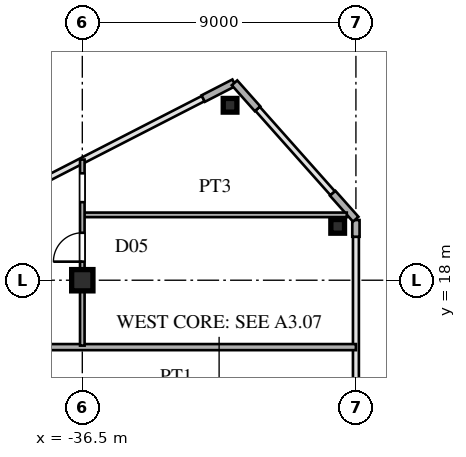
"""IFC4 building model, lengths in metres.
Left out: names, types, materials, properties, quantities, classifications, styles, units other than length and angle.
Written with IfcOpenShell. Run it as: python <this file> out.ifc"""

import sys

from ifc_helpers import new_model, si_unit, direction, frame, frame_2d, origin, origin_2d, place, context, subcontext, project, spatial, rectangle, hollow_rectangle, i_section, extrude, source, transform, mapped, element, fill, save


model = new_model("IFC4")
c1 = context("Model", 3, precision=1e-05, world=origin(), true_north=direction((0.0, 1.0)))
c2 = subcontext(c1, "Body", "Model", "MODEL_VIEW")
j1 = project(units=[si_unit("LENGTHUNIT", "METRE"), si_unit("PLANEANGLEUNIT", "RADIAN")], contexts=[c1])
p1 = place(None, origin())
s1 = spatial("IfcSite", under=j1, at=p1, CompositionType="ELEMENT")
p2 = place(p1, origin())
s2 = spatial("IfcBuilding", under=s1, at=p2, CompositionType="ELEMENT")
p3 = place(p2, frame((0.0, 0.0, 154.8)))
s3 = spatial("IfcBuildingStorey", under=s2, at=p3, CompositionType="ELEMENT", Elevation=154.8)
m1 = source(origin(), c2, "Body", "SweptSolid", [
    extrude(i_section(OverallWidth=0.7, OverallDepth=0.7, WebThickness=0.028, FlangeThickness=0.045, at=origin_2d()), origin(), (0.0, 0.0, 1.0), 3.6),
])
p4 = place(p3, frame((-36.5, 18.0, 0.0), z_axis=(0.0, 0.0, 1.0), x_axis=(1.0, 0.0, 0.0)))
e1 = element("IfcColumn", 1, at=p4, inside=s3, PredefinedType="COLUMN", context=c2, shape_type="MappedRepresentation", body=[
    mapped(m1, transform((0.0, 0.0, 0.0), scale=1.0)),
])
m2 = source(origin(), c2, "Body", "SweptSolid", [
    extrude(hollow_rectangle(XDim=0.45, YDim=0.45, WallThickness=0.018, at=origin_2d()), origin(), (0.0, 0.0, 1.0), 3.6),
])
for number, where, z_axis, x_axis in (
    (2, (-28.1, 19.772, 0.0), (0.0, 0.0, 1.0), (1.0, 0.0, 0.0)),
    (3, (-31.64, 23.754, 0.0), (0.0, 0.0, 1.0), (1.0, 0.0, 0.0)),
):
    element("IfcColumn", number, at=place(p3, frame(where, z_axis=z_axis, x_axis=x_axis)), inside=s3, PredefinedType="COLUMN", context=c2, shape_type="MappedRepresentation", body=[
        mapped(m2, transform((0.0, 0.0, 0.0), scale=1.0)),
    ])
p5 = place(p3, frame((-27.5, 19.43, 0.0), z_axis=(0.0, 0.0, 1.0), x_axis=(0.0, 1.0, 0.0)))
e4 = element("IfcWall", 4, at=p5, inside=s3, PredefinedType="SOLIDWALL", context=c2, shape_type="SweptSolid", body=[
    extrude(rectangle(XDim=0.55, YDim=0.24, at=frame_2d((0.275, 0.0))), origin(), (0.0, 0.0, 1.0), 3.38),
])
for number, where, z_axis, x_axis in (
    (5, (-27.507, 20.008, 0.0), (0.0, 0.0, 1.0), (-0.664, 0.747, 0.0)),
    (6, (-30.736, 23.64, 0.0), (0.0, 0.0, 1.0), (-0.664, 0.747, 0.0)),
):
    element("IfcWall", number, at=place(p3, frame(where, z_axis=z_axis, x_axis=x_axis)), inside=s3, PredefinedType="SOLIDWALL", context=c2, shape_type="SweptSolid", body=[
        extrude(rectangle(XDim=1.14, YDim=0.24, at=frame_2d((0.57, 0.0))), origin(), (0.0, 0.0, 1.0), 3.38),
    ])
p6 = place(p3, frame((-31.509, 24.495, 0.0), z_axis=(0.0, 0.0, 1.0), x_axis=(-0.889797395748, -0.456355776255, 0.0)))
e7 = element("IfcWall", 7, at=p6, inside=s3, PredefinedType="SOLIDWALL", context=c2, shape_type="SweptSolid", body=[
    extrude(rectangle(XDim=1.14, YDim=0.24, at=frame_2d((0.57, 0.0))), origin(), (0.0, 0.0, 1.0), 3.38),
])
p7 = place(p3, frame((-39.315, 15.8, 0.0), z_axis=(0.0, 0.0, 1.0), x_axis=(1.0, 0.0, 0.0)))
e8 = element("IfcWall", 8, at=p7, inside=s3, PredefinedType="PARTITIONING", context=c2, shape_type="SweptSolid", body=[
    extrude(rectangle(XDim=11.815, YDim=0.2, at=frame_2d((5.907, 0.0))), origin(), (0.0, 0.0, 1.0), 3.38),
])
p8 = place(p3, frame((-36.45, 20.15, 0.0), z_axis=(0.0, 0.0, 1.0), x_axis=(1.0, 0.0, 0.0)))
e9 = element("IfcWall", 9, at=p8, inside=s3, PredefinedType="PARTITIONING", context=c2, shape_type="SweptSolid", body=[
    extrude(rectangle(XDim=8.649, YDim=0.15, at=frame_2d((4.325, 0.0))), origin(), (0.0, 0.0, 1.0), 3.38),
])
p9 = place(p3, frame((-36.5, 15.85, 0.0), z_axis=(0.0, 0.0, 1.0), x_axis=(0.0, 1.0, 0.0)))
e10 = element("IfcWall", 10, at=p9, inside=s3, PredefinedType="PARTITIONING", context=c2, shape_type="SweptSolid", body=[
    extrude(rectangle(XDim=2.17, YDim=0.15, at=frame_2d((1.085, 0.0))), origin(), (0.0, 0.0, 1.0), 1.38),
])
p10 = place(p3, frame((-36.5, 18.02, 0.0), z_axis=(0.0, 0.0, 1.0), x_axis=(0.0, 1.0, 0.0)))
e11 = element("IfcWall", 11, at=p10, inside=s3, PredefinedType="PARTITIONING", context=c2, shape_type="SweptSolid", body=[
    extrude(rectangle(XDim=3.949, YDim=0.15, at=frame_2d((1.975, 0.0))), origin(), (0.0, 0.0, 1.0), 3.38),
])
p11 = place(p10, frame((0.591, 0.0, 0.0)))
e12 = element("IfcOpeningElement", 12, at=p11, cuts=e11, PredefinedType="OPENING", context=c2, shape_type="SweptSolid", body=[
    extrude(rectangle(XDim=0.95, YDim=2.15, at=frame_2d((0.475, 1.075))), frame((0.0, 0.085, 0.0), z_axis=(0.0, -1.0, 0.0), x_axis=(1.0, 0.0, 0.0)), (0.0, 0.0, 1.0), 0.17),
])
p12 = place(p10, frame((2.547, 0.0, 0.0)))
e13 = element("IfcOpeningElement", 13, at=p12, cuts=e11, PredefinedType="OPENING", context=c2, shape_type="SweptSolid", body=[
    extrude(rectangle(XDim=0.95, YDim=2.15, at=frame_2d((0.475, 1.075))), frame((0.0, 0.085, 0.0), z_axis=(0.0, -1.0, 0.0), x_axis=(1.0, 0.0, 0.0)), (0.0, 0.0, 1.0), 0.17),
])
m3 = source(origin(), c2, "Body", "SweptSolid", [
    extrude(rectangle(XDim=0.95, YDim=2.15, at=frame_2d((0.475, 1.075))), frame((0.0, 0.025, 0.0), z_axis=(0.0, -1.0, 0.0), x_axis=(1.0, 0.0, 0.0)), (0.0, 0.0, 1.0), 0.05),
])
p13 = place(p11, origin())
e14 = element("IfcDoor", 14, at=p13, inside=s3, OperationType="SINGLE_SWING_LEFT", PredefinedType="DOOR", context=c2, shape_type="MappedRepresentation", body=[
    mapped(m3, transform((0.0, 0.0, 0.0), scale=1.0)),
])
fill(e12, e14)
save(model, sys.argv[1])
